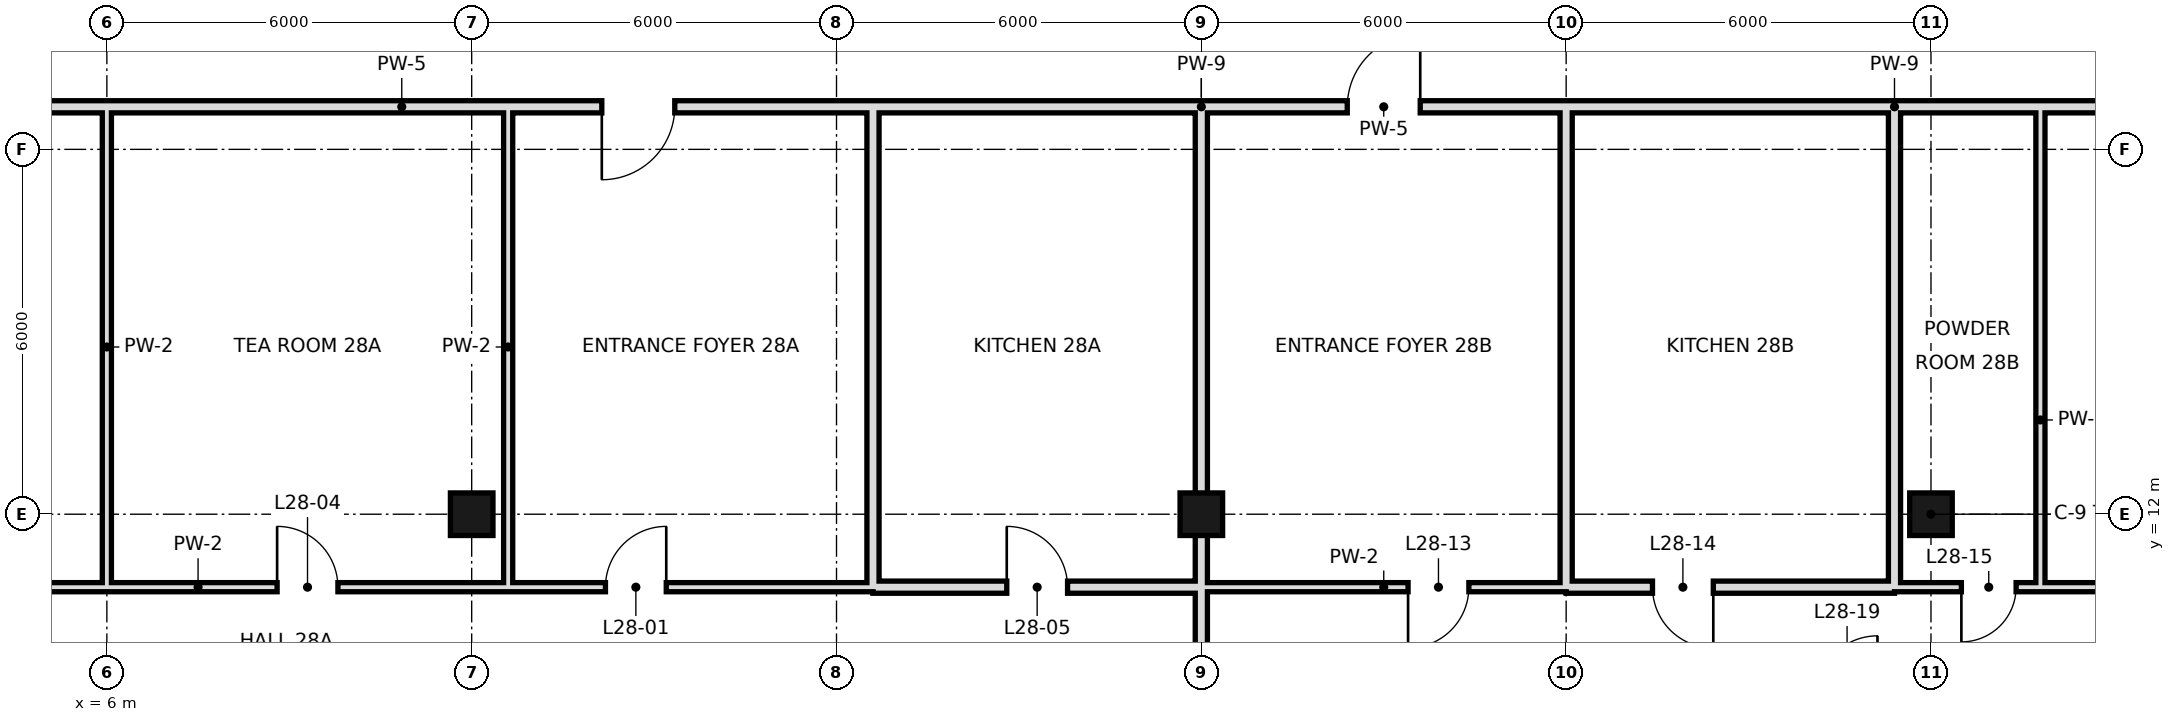
"""IFC4 building model, lengths in metres.
Left out: names, types, materials, properties, quantities, classifications, styles, units other than length and angle.
Written with IfcOpenShell. Run it as: python <this file> out.ifc"""

import sys

from ifc_helpers import new_model, si_unit, direction, frame, frame_2d, origin, origin_2d, place, context, subcontext, project, spatial, rectangle, hollow_rectangle, extrude, element, fill, save


model = new_model("IFC4")
c1 = context("Model", 3, precision=1e-05, world=origin(), true_north=direction((0.0, 1.0)))
c2 = subcontext(c1, "Body", "Model", "MODEL_VIEW")
j1 = project(units=[si_unit("LENGTHUNIT", "METRE"), si_unit("PLANEANGLEUNIT", "RADIAN")], contexts=[c1])
p1 = place(None, origin())
s1 = spatial("IfcSite", under=j1, at=p1, CompositionType="ELEMENT")
p2 = place(p1, origin())
s2 = spatial("IfcBuilding", under=s1, at=p2, CompositionType="ELEMENT")
p3 = place(p2, frame((0.0, 0.0, 126.8)))
s3 = spatial("IfcBuildingStorey", under=s2, at=p3, CompositionType="ELEMENT", Elevation=126.8)
for number, where, z_axis, x_axis in (
    (1, (12.0, 12.0, 0.0), (0.0, 0.0, 1.0), (1.0, 0.0, 0.0)),
    (2, (24.0, 12.0, 0.0), (0.0, 0.0, 1.0), (1.0, 0.0, 0.0)),
    (3, (36.0, 12.0, 0.0), (0.0, 0.0, 1.0), (1.0, 0.0, 0.0)),
):
    element("IfcColumn", number, at=place(p3, frame(where, z_axis=z_axis, x_axis=x_axis)), inside=s3, PredefinedType="COLUMN", context=c2, shape_type="SweptSolid", body=[
        extrude(hollow_rectangle(XDim=0.7, YDim=0.7, WallThickness=0.036, at=origin_2d()), origin(), (0.0, 0.0, 1.0), 3.6),
    ])
p4 = place(p3, frame((12.6, 10.8, 0.0), z_axis=(0.0, 0.0, 1.0), x_axis=(0.0, 1.0, 0.0)))
e4 = element("IfcWall", 4, at=p4, inside=s3, PredefinedType="PARTITIONING", context=c2, shape_type="SweptSolid", body=[
    extrude(rectangle(XDim=7.9, YDim=0.15, at=frame_2d((3.95, 0.0))), origin(), (0.0, 0.0, 1.0), 3.42),
])
for number, where, z_axis, x_axis in (
    (5, (18.6, 10.8, 0.0), (0.0, 0.0, 1.0), (0.0, 1.0, 0.0)),
    (6, (24.0, 10.8, 0.0), (0.0, 0.0, 1.0), (0.0, 1.0, 0.0)),
):
    element("IfcWall", number, at=place(p3, frame(where, z_axis=z_axis, x_axis=x_axis)), inside=s3, PredefinedType="SOLIDWALL", context=c2, shape_type="SweptSolid", body=[
        extrude(rectangle(XDim=7.9, YDim=0.2, at=frame_2d((3.95, 0.0))), origin(), (0.0, 0.0, 1.0), 2.72),
    ])
p5 = place(p3, frame((24.0, 0.0, 0.0), z_axis=(0.0, 0.0, 1.0), x_axis=(0.0, 1.0, 0.0)))
e7 = element("IfcWall", 7, at=p5, inside=s3, PredefinedType="SOLIDWALL", context=c2, shape_type="SweptSolid", body=[
    extrude(rectangle(XDim=10.8, YDim=0.2, at=frame_2d((5.4, 0.0))), origin(), (0.0, 0.0, 1.0), 2.72),
])
for number, where, z_axis, x_axis in (
    (8, (30.0, 10.8, 0.0), (0.0, 0.0, 1.0), (0.0, 1.0, 0.0)),
    (9, (35.4, 10.8, 0.0), (0.0, 0.0, 1.0), (0.0, 1.0, 0.0)),
):
    element("IfcWall", number, at=place(p3, frame(where, z_axis=z_axis, x_axis=x_axis)), inside=s3, PredefinedType="SOLIDWALL", context=c2, shape_type="SweptSolid", body=[
        extrude(rectangle(XDim=7.9, YDim=0.2, at=frame_2d((3.95, 0.0))), origin(), (0.0, 0.0, 1.0), 2.72),
    ])
p6 = place(p3, frame((37.8, 10.8, 0.0), z_axis=(0.0, 0.0, 1.0), x_axis=(0.0, 1.0, 0.0)))
e10 = element("IfcWall", 10, at=p6, inside=s3, PredefinedType="PARTITIONING", context=c2, shape_type="SweptSolid", body=[
    extrude(rectangle(XDim=7.9, YDim=0.15, at=frame_2d((3.95, 0.0))), origin(), (0.0, 0.0, 1.0), 3.42),
])
p7 = place(p3, frame((6.0, 10.8, 0.0), z_axis=(0.0, 0.0, 1.0), x_axis=(0.0, 1.0, 0.0)))
e11 = element("IfcWall", 11, at=p7, inside=s3, PredefinedType="PARTITIONING", context=c2, shape_type="SweptSolid", body=[
    extrude(rectangle(XDim=7.9, YDim=0.15, at=frame_2d((3.95, 0.0))), origin(), (0.0, 0.0, 1.0), 2.72),
])
p8 = place(p3, frame((18.6, 10.8, 0.0), z_axis=(0.0, 0.0, 1.0), x_axis=(1.0, 0.0, 0.0)))
e12 = element("IfcWall", 12, at=p8, inside=s3, PredefinedType="SOLIDWALL", context=c2, shape_type="SweptSolid", body=[
    extrude(rectangle(XDim=5.4, YDim=0.2, at=frame_2d((2.7, 0.0))), origin(), (0.0, 0.0, 1.0), 2.72),
])
p9 = place(p8, frame((2.2, 0.0, 0.0)))
e13 = element("IfcOpeningElement", 13, at=p9, cuts=e12, PredefinedType="OPENING", context=c2, shape_type="SweptSolid", body=[
    extrude(rectangle(XDim=1.0, YDim=2.4, at=frame_2d((0.5, 1.2))), frame((0.0, 0.11, 0.0), z_axis=(0.0, -1.0, 0.0), x_axis=(1.0, 0.0, 0.0)), (0.0, 0.0, 1.0), 0.22),
])
p10 = place(p3, frame((30.0, 10.8, 0.0), z_axis=(0.0, 0.0, 1.0), x_axis=(1.0, 0.0, 0.0)))
e14 = element("IfcWall", 14, at=p10, inside=s3, PredefinedType="SOLIDWALL", context=c2, shape_type="SweptSolid", body=[
    extrude(rectangle(XDim=5.4, YDim=0.2, at=frame_2d((2.7, 0.0))), origin(), (0.0, 0.0, 1.0), 2.72),
])
p11 = place(p10, frame((1.42, 0.0, 0.0)))
e15 = element("IfcOpeningElement", 15, at=p11, cuts=e14, PredefinedType="OPENING", context=c2, shape_type="SweptSolid", body=[
    extrude(rectangle(XDim=1.0, YDim=2.4, at=frame_2d((0.5, 1.2))), frame((0.0, 0.11, 0.0), z_axis=(0.0, -1.0, 0.0), x_axis=(1.0, 0.0, 0.0)), (0.0, 0.0, 1.0), 0.22),
])
p12 = place(p3, frame((-3.6, 10.8, 0.0), z_axis=(0.0, 0.0, 1.0), x_axis=(1.0, 0.0, 0.0)))
e16 = element("IfcWall", 16, at=p12, inside=s3, PredefinedType="PARTITIONING", context=c2, shape_type="SweptSolid", body=[
    extrude(rectangle(XDim=22.2, YDim=0.15, at=frame_2d((11.1, 0.0))), origin(), (0.0, 0.0, 1.0), 3.42),
])
p13 = place(p12, frame((17.8, 0.0, 0.0)))
e17 = element("IfcOpeningElement", 17, at=p13, cuts=e16, PredefinedType="OPENING", context=c2, shape_type="SweptSolid", body=[
    extrude(rectangle(XDim=1.0, YDim=2.4, at=frame_2d((0.5, 1.2))), frame((0.0, 0.085, 0.0), z_axis=(0.0, -1.0, 0.0), x_axis=(1.0, 0.0, 0.0)), (0.0, 0.0, 1.0), 0.17),
])
p14 = place(p12, frame((5.92, 0.0, 0.0)))
e18 = element("IfcOpeningElement", 18, at=p14, cuts=e16, PredefinedType="OPENING", context=c2, shape_type="SweptSolid", body=[
    extrude(rectangle(XDim=1.0, YDim=2.4, at=frame_2d((0.5, 1.2))), frame((0.0, 0.085, 0.0), z_axis=(0.0, -1.0, 0.0), x_axis=(1.0, 0.0, 0.0)), (0.0, 0.0, 1.0), 0.17),
])
p15 = place(p12, frame((12.4, 0.0, 0.0)))
e19 = element("IfcOpeningElement", 19, at=p15, cuts=e16, PredefinedType="OPENING", context=c2, shape_type="SweptSolid", body=[
    extrude(rectangle(XDim=1.0, YDim=2.4, at=frame_2d((0.5, 1.2))), frame((0.0, 0.085, 0.0), z_axis=(0.0, -1.0, 0.0), x_axis=(1.0, 0.0, 0.0)), (0.0, 0.0, 1.0), 0.17),
])
p16 = place(p3, frame((24.0, 10.8, 0.0), z_axis=(0.0, 0.0, 1.0), x_axis=(1.0, 0.0, 0.0)))
e20 = element("IfcWall", 20, at=p16, inside=s3, PredefinedType="PARTITIONING", context=c2, shape_type="SweptSolid", body=[
    extrude(rectangle(XDim=6.0, YDim=0.15, at=frame_2d((3.0, 0.0))), origin(), (0.0, 0.0, 1.0), 3.42),
])
p17 = place(p16, frame((3.4, 0.0, 0.0)))
e21 = element("IfcOpeningElement", 21, at=p17, cuts=e20, PredefinedType="OPENING", context=c2, shape_type="SweptSolid", body=[
    extrude(rectangle(XDim=1.0, YDim=2.4, at=frame_2d((0.5, 1.2))), frame((0.0, 0.085, 0.0), z_axis=(0.0, -1.0, 0.0), x_axis=(1.0, 0.0, 0.0)), (0.0, 0.0, 1.0), 0.17),
])
p18 = place(p3, frame((37.8, 10.8, 0.0), z_axis=(0.0, 0.0, 1.0), x_axis=(1.0, 0.0, 0.0)))
e22 = element("IfcWall", 22, at=p18, inside=s3, PredefinedType="PARTITIONING", context=c2, shape_type="SweptSolid", body=[
    extrude(rectangle(XDim=22.8, YDim=0.15, at=frame_2d((11.4, 0.0))), origin(), (0.0, 0.0, 1.0), 3.42),
])
p19 = place(p18, frame((5.2, 0.0, 0.0)))
e23 = element("IfcOpeningElement", 23, at=p19, cuts=e22, PredefinedType="OPENING", context=c2, shape_type="SweptSolid", body=[
    extrude(rectangle(XDim=1.0, YDim=2.4, at=frame_2d((0.5, 1.2))), frame((0.0, 0.085, 0.0), z_axis=(0.0, -1.0, 0.0), x_axis=(1.0, 0.0, 0.0)), (0.0, 0.0, 1.0), 0.17),
])
p20 = place(p18, frame((11.65, 0.0, 0.0)))
e24 = element("IfcOpeningElement", 24, at=p20, cuts=e22, PredefinedType="OPENING", context=c2, shape_type="SweptSolid", body=[
    extrude(rectangle(XDim=1.0, YDim=2.4, at=frame_2d((0.5, 1.2))), frame((0.0, 0.085, 0.0), z_axis=(0.0, -1.0, 0.0), x_axis=(1.0, 0.0, 0.0)), (0.0, 0.0, 1.0), 0.17),
])
p21 = place(p3, frame((35.4, 10.8, 0.0), z_axis=(0.0, 0.0, 1.0), x_axis=(1.0, 0.0, 0.0)))
e25 = element("IfcWall", 25, at=p21, inside=s3, PredefinedType="PARTITIONING", context=c2, shape_type="SweptSolid", body=[
    extrude(rectangle(XDim=2.4, YDim=0.15, at=frame_2d((1.2, 0.0))), origin(), (0.0, 0.0, 1.0), 3.42),
])
p22 = place(p21, frame((1.1, 0.0, 0.0)))
e26 = element("IfcOpeningElement", 26, at=p22, cuts=e25, PredefinedType="OPENING", context=c2, shape_type="SweptSolid", body=[
    extrude(rectangle(XDim=0.9, YDim=2.4, at=frame_2d((0.45, 1.2))), frame((0.0, 0.085, 0.0), z_axis=(0.0, -1.0, 0.0), x_axis=(1.0, 0.0, 0.0)), (0.0, 0.0, 1.0), 0.17),
])
p23 = place(p3, frame((3.1, 18.7, 0.0), z_axis=(0.0, 0.0, 1.0), x_axis=(1.0, 0.0, 0.0)))
e27 = element("IfcWall", 27, at=p23, inside=s3, PredefinedType="SOLIDWALL", context=c2, shape_type="SweptSolid", body=[
    extrude(rectangle(XDim=15.5, YDim=0.2, at=frame_2d((7.75, 0.0))), origin(), (0.0, 0.0, 1.0), 2.72),
])
p24 = place(p23, frame((11.04, 0.0, 0.0)))
e28 = element("IfcOpeningElement", 28, at=p24, cuts=e27, PredefinedType="OPENING", context=c2, shape_type="SweptSolid", body=[
    extrude(rectangle(XDim=1.2, YDim=2.4, at=frame_2d((0.6, 1.2))), frame((0.0, 0.11, 0.0), z_axis=(0.0, -1.0, 0.0), x_axis=(1.0, 0.0, 0.0)), (0.0, 0.0, 1.0), 0.22),
])
p25 = place(p3, frame((24.0, 18.7, 0.0), z_axis=(0.0, 0.0, 1.0), x_axis=(1.0, 0.0, 0.0)))
e29 = element("IfcWall", 29, at=p25, inside=s3, PredefinedType="SOLIDWALL", context=c2, shape_type="SweptSolid", body=[
    extrude(rectangle(XDim=6.0, YDim=0.2, at=frame_2d((3.0, 0.0))), origin(), (0.0, 0.0, 1.0), 2.72),
])
p26 = place(p25, frame((2.4, 0.0, 0.0)))
e30 = element("IfcOpeningElement", 30, at=p26, cuts=e29, PredefinedType="OPENING", context=c2, shape_type="SweptSolid", body=[
    extrude(rectangle(XDim=1.2, YDim=2.4, at=frame_2d((0.6, 1.2))), frame((0.0, 0.11, 0.0), z_axis=(0.0, -1.0, 0.0), x_axis=(1.0, 0.0, 0.0)), (0.0, 0.0, 1.0), 0.22),
])
p27 = place(p3, frame((35.4, 18.7, 0.0), z_axis=(0.0, 0.0, 1.0), x_axis=(1.0, 0.0, 0.0)))
e31 = element("IfcWall", 31, at=p27, inside=s3, PredefinedType="SOLIDWALL", context=c2, shape_type="SweptSolid", body=[
    extrude(rectangle(XDim=9.5, YDim=0.2, at=frame_2d((4.75, 0.0))), origin(), (0.0, 0.0, 1.0), 2.72),
])
p28 = place(p3, frame((18.6, 18.7, 0.0), z_axis=(0.0, 0.0, 1.0), x_axis=(1.0, 0.0, 0.0)))
e32 = element("IfcWall", 32, at=p28, inside=s3, PredefinedType="SOLIDWALL", context=c2, shape_type="SweptSolid", body=[
    extrude(rectangle(XDim=5.4, YDim=0.2, at=frame_2d((2.7, 0.0))), origin(), (0.0, 0.0, 1.0), 3.42),
])
p29 = place(p3, frame((30.0, 18.7, 0.0), z_axis=(0.0, 0.0, 1.0), x_axis=(1.0, 0.0, 0.0)))
e33 = element("IfcWall", 33, at=p29, inside=s3, PredefinedType="SOLIDWALL", context=c2, shape_type="SweptSolid", body=[
    extrude(rectangle(XDim=5.4, YDim=0.2, at=frame_2d((2.7, 0.0))), origin(), (0.0, 0.0, 1.0), 2.72),
])
p30 = place(p13, frame((1.0, 0.0, 0.0), z_axis=(0.0, 0.0, 1.0), x_axis=(-1.0, 0.0, 0.0)))
e34 = element("IfcDoor", 34, at=p30, inside=s3, OperationType="SINGLE_SWING_LEFT", PredefinedType="DOOR", context=c2, shape_type="SweptSolid", body=[
    extrude(rectangle(XDim=1.0, YDim=2.4, at=frame_2d((0.5, 1.2))), frame((0.0, 0.025, 0.0), z_axis=(0.0, -1.0, 0.0), x_axis=(1.0, 0.0, 0.0)), (0.0, 0.0, 1.0), 0.05),
])
fill(e17, e34)
p31 = place(p15, origin())
e35 = element("IfcDoor", 35, at=p31, inside=s3, OperationType="SINGLE_SWING_LEFT", PredefinedType="DOOR", context=c2, shape_type="SweptSolid", body=[
    extrude(rectangle(XDim=1.0, YDim=2.4, at=frame_2d((0.5, 1.2))), frame((0.0, 0.025, 0.0), z_axis=(0.0, -1.0, 0.0), x_axis=(1.0, 0.0, 0.0)), (0.0, 0.0, 1.0), 0.05),
])
fill(e19, e35)
p32 = place(p9, origin())
e36 = element("IfcDoor", 36, at=p32, inside=s3, OperationType="SINGLE_SWING_LEFT", PredefinedType="DOOR", context=c2, shape_type="SweptSolid", body=[
    extrude(rectangle(XDim=1.0, YDim=2.4, at=frame_2d((0.5, 1.2))), frame((0.0, 0.025, 0.0), z_axis=(0.0, -1.0, 0.0), x_axis=(1.0, 0.0, 0.0)), (0.0, 0.0, 1.0), 0.05),
])
fill(e13, e36)
p33 = place(p17, frame((1.0, 0.0, 0.0), z_axis=(0.0, 0.0, 1.0), x_axis=(-1.0, 0.0, 0.0)))
e37 = element("IfcDoor", 37, at=p33, inside=s3, OperationType="SINGLE_SWING_RIGHT", PredefinedType="DOOR", context=c2, shape_type="SweptSolid", body=[
    extrude(rectangle(XDim=1.0, YDim=2.4, at=frame_2d((0.5, 1.2))), frame((0.0, 0.025, 0.0), z_axis=(0.0, -1.0, 0.0), x_axis=(1.0, 0.0, 0.0)), (0.0, 0.0, 1.0), 0.05),
])
fill(e21, e37)
p34 = place(p11, origin())
e38 = element("IfcDoor", 38, at=p34, inside=s3, OperationType="SINGLE_SWING_RIGHT", PredefinedType="DOOR", context=c2, shape_type="SweptSolid", body=[
    extrude(rectangle(XDim=1.0, YDim=2.4, at=frame_2d((0.5, 1.2))), frame((0.0, 0.025, 0.0), z_axis=(0.0, -1.0, 0.0), x_axis=(1.0, 0.0, 0.0)), (0.0, 0.0, 1.0), 0.05),
])
fill(e15, e38)
p35 = place(p22, frame((0.9, 0.0, 0.0), z_axis=(0.0, 0.0, 1.0), x_axis=(-1.0, 0.0, 0.0)))
e39 = element("IfcDoor", 39, at=p35, inside=s3, OperationType="SINGLE_SWING_RIGHT", PredefinedType="DOOR", context=c2, shape_type="SweptSolid", body=[
    extrude(rectangle(XDim=0.9, YDim=2.4, at=frame_2d((0.45, 1.2))), frame((0.0, 0.025, 0.0), z_axis=(0.0, -1.0, 0.0), x_axis=(1.0, 0.0, 0.0)), (0.0, 0.0, 1.0), 0.05),
])
fill(e26, e39)
p36 = place(p24, frame((1.2, 0.0, 0.0), z_axis=(0.0, 0.0, 1.0), x_axis=(-1.0, 0.0, 0.0)))
e40 = element("IfcDoor", 40, at=p36, inside=s3, OperationType="SINGLE_SWING_RIGHT", PredefinedType="DOOR", context=c2, shape_type="SweptSolid", body=[
    extrude(rectangle(XDim=1.2, YDim=2.4, at=frame_2d((0.6, 1.2))), frame((0.0, 0.025, 0.0), z_axis=(0.0, -1.0, 0.0), x_axis=(1.0, 0.0, 0.0)), (0.0, 0.0, 1.0), 0.05),
])
fill(e28, e40)
p37 = place(p26, frame((1.2, 0.0, 0.0), z_axis=(0.0, 0.0, 1.0), x_axis=(-1.0, 0.0, 0.0)))
e41 = element("IfcDoor", 41, at=p37, inside=s3, OperationType="SINGLE_SWING_LEFT", PredefinedType="DOOR", context=c2, shape_type="SweptSolid", body=[
    extrude(rectangle(XDim=1.2, YDim=2.4, at=frame_2d((0.6, 1.2))), frame((0.0, 0.025, 0.0), z_axis=(0.0, -1.0, 0.0), x_axis=(1.0, 0.0, 0.0)), (0.0, 0.0, 1.0), 0.05),
])
fill(e30, e41)
save(model, sys.argv[1])
